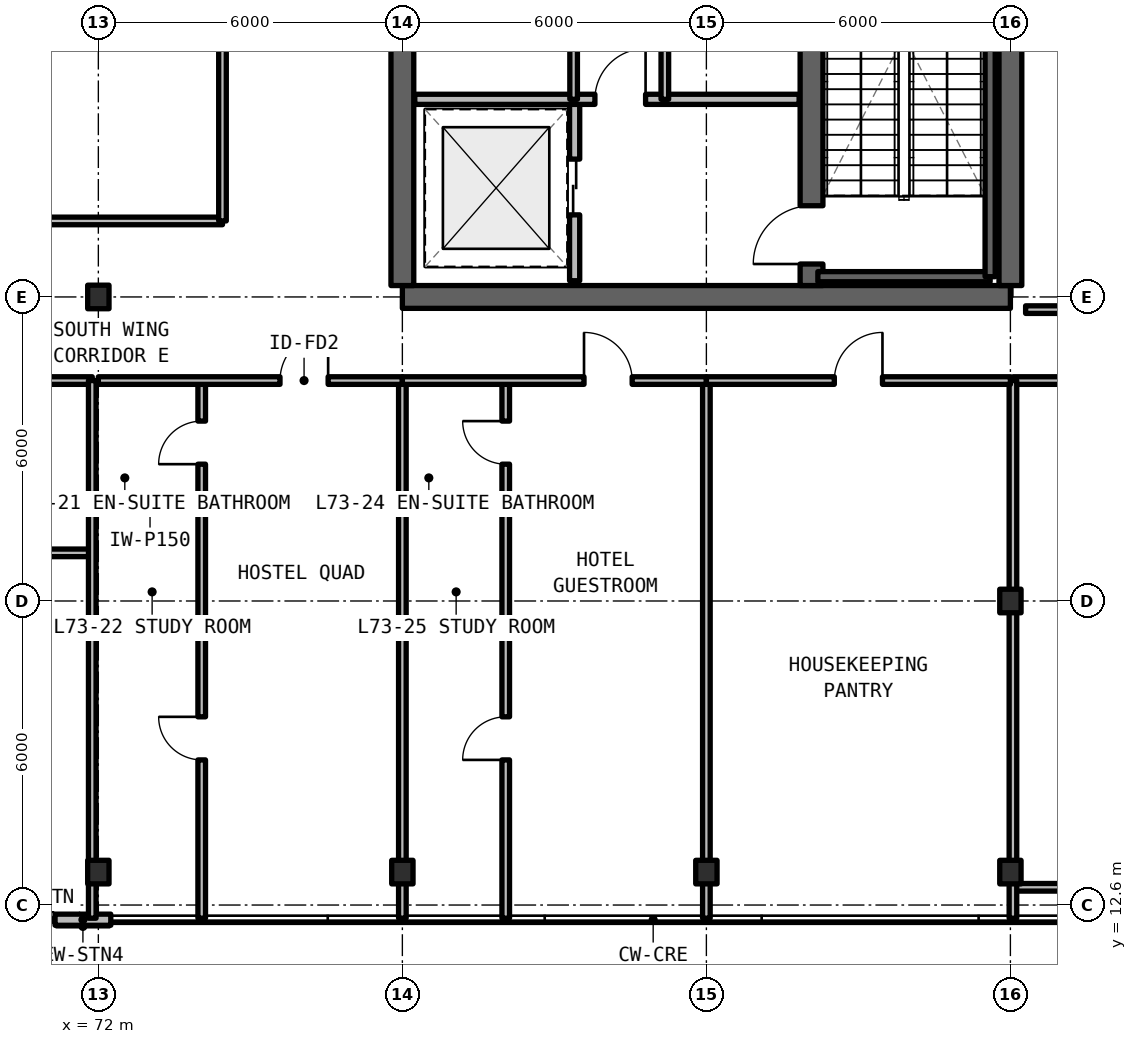
"""IFC4 building model, lengths in metres.
Left out: names, types, materials, properties, quantities, classifications, styles, units other than length and angle.
Written with IfcOpenShell. Run it as: python <this file> out.ifc"""

import sys

from ifc_helpers import new_model, si_unit, direction, frame, frame_2d, origin, origin_2d, place, context, subcontext, project, spatial, rectangle, i_section, extrude, element, fill, save


model = new_model("IFC4")
c1 = context("Model", 3, precision=1e-05, world=origin(), true_north=direction((0.0, 1.0)))
c2 = subcontext(c1, "Body", "Model", "MODEL_VIEW")
j1 = project(units=[si_unit("LENGTHUNIT", "METRE"), si_unit("PLANEANGLEUNIT", "RADIAN")], contexts=[c1])
p1 = place(None, origin())
s1 = spatial("IfcSite", under=j1, at=p1, CompositionType="ELEMENT")
p2 = place(p1, origin())
s2 = spatial("IfcBuilding", under=s1, at=p2, CompositionType="ELEMENT")
p3 = place(p2, frame((0.0, 0.0, 260.7)))
s3 = spatial("IfcBuildingStorey", under=s2, at=p3, CompositionType="ELEMENT", Elevation=260.7)
p4 = place(p3, frame((78.0, 24.6, 0.0), z_axis=(0.0, 0.0, 1.0), x_axis=(1.0, 0.0, 0.0)))
e1 = element("IfcWall", 1, at=p4, inside=s3, PredefinedType="SHEAR", context=c2, shape_type="SweptSolid", body=[
    extrude(rectangle(XDim=12.0, YDim=0.45, at=frame_2d((6.0, 0.0))), origin(), (0.0, 0.0, 1.0), 3.63),
])
p5 = place(p3, frame((90.0, 24.825, 0.0), z_axis=(0.0, 0.0, 1.0), x_axis=(0.0, 1.0, 0.0)))
e2 = element("IfcWall", 2, at=p5, inside=s3, PredefinedType="SHEAR", context=c2, shape_type="SweptSolid", body=[
    extrude(rectangle(XDim=17.55, YDim=0.45, at=frame_2d((8.775, 0.0))), origin(), (0.0, 0.0, 1.0), 3.63),
])
p6 = place(p3, frame((78.0, 24.825, 0.0), z_axis=(0.0, 0.0, 1.0), x_axis=(0.0, 1.0, 0.0)))
e3 = element("IfcWall", 3, at=p6, inside=s3, PredefinedType="SHEAR", context=c2, shape_type="SweptSolid", body=[
    extrude(rectangle(XDim=8.975, YDim=0.45, at=frame_2d((4.488, 0.0))), origin(), (0.0, 0.0, 1.0), 3.63),
])
p7 = place(p3, frame((86.075, 24.825, 0.0), z_axis=(0.0, 0.0, 1.0), x_axis=(0.0, 1.0, 0.0)))
e4 = element("IfcWall", 4, at=p7, inside=s3, PredefinedType="SHEAR", context=c2, shape_type="SweptSolid", body=[
    extrude(rectangle(XDim=17.55, YDim=0.45, at=frame_2d((8.775, 0.0))), origin(), (0.0, 0.0, 1.0), 3.63),
])
p8 = place(p7, frame((0.425, 0.0, 0.0)))
e5 = element("IfcOpeningElement", 5, at=p8, cuts=e4, PredefinedType="OPENING", context=c2, shape_type="SweptSolid", body=[
    extrude(rectangle(XDim=1.15, YDim=2.15, at=frame_2d((0.575, 1.075))), frame((0.0, 0.235, 0.0), z_axis=(0.0, -1.0, 0.0), x_axis=(1.0, 0.0, 0.0)), (0.0, 0.0, 1.0), 0.47),
])
p9 = place(p7, frame((9.625, 0.0, 0.0)))
e6 = element("IfcOpeningElement", 6, at=p9, cuts=e4, PredefinedType="OPENING", context=c2, shape_type="SweptSolid", body=[
    extrude(rectangle(XDim=1.15, YDim=2.15, at=frame_2d((0.575, 1.075))), frame((0.0, 0.235, 0.0), z_axis=(0.0, -1.0, 0.0), x_axis=(1.0, 0.0, 0.0)), (0.0, 0.0, 1.0), 0.47),
])
for number, where, z_axis, x_axis in (
    (7, (72.0, 24.6, 0.0), (0.0, 0.0, 1.0), (1.0, 0.0, 0.0)),
    (8, (90.0, 18.6, 0.0), (0.0, 0.0, 1.0), (1.0, 0.0, 0.0)),
    (9, (72.0, 13.25, 0.0), (0.0, 0.0, 1.0), (1.0, 0.0, 0.0)),
    (10, (78.0, 13.25, 0.0), (0.0, 0.0, 1.0), (1.0, 0.0, 0.0)),
    (11, (84.0, 13.25, 0.0), (0.0, 0.0, 1.0), (1.0, 0.0, 0.0)),
    (12, (90.0, 13.25, 0.0), (0.0, 0.0, 1.0), (1.0, 0.0, 0.0)),
):
    element("IfcColumn", number, at=place(p3, frame(where, z_axis=z_axis, x_axis=x_axis)), inside=s3, PredefinedType="COLUMN", context=c2, shape_type="SweptSolid", body=[
        extrude(i_section(OverallWidth=0.421, OverallDepth=0.465, WebThickness=0.045, FlangeThickness=0.07, FilletRadius=0.015, at=origin_2d()), origin(), (0.0, 0.0, 1.0), 3.63),
    ])
p10 = place(p3, frame((71.146, 12.31, 0.0), z_axis=(0.0, 0.0, 1.0), x_axis=(1.0, 0.0, 0.0)))
e13 = element("IfcWall", 13, at=p10, inside=s3, PredefinedType="SOLIDWALL", context=c2, shape_type="SweptSolid", body=[
    extrude(rectangle(XDim=1.1, YDim=0.22, at=frame_2d((0.55, 0.0))), origin(), (0.0, 0.0, 1.0), 3.41),
])
p11 = place(p3, frame((81.4, 24.92, 0.0), z_axis=(0.0, 0.0, 1.0), x_axis=(0.0, 1.0, 0.0)))
e14 = element("IfcWall", 14, at=p11, inside=s3, PredefinedType="SOLIDWALL", context=c2, shape_type="SweptSolid", body=[
    extrude(rectangle(XDim=3.58, YDim=0.2, at=frame_2d((1.79, 0.0))), origin(), (0.0, 0.0, 1.0), 2.63),
])
p12 = place(p11, frame((1.3, 0.0, 0.0)))
e15 = element("IfcOpeningElement", 15, at=p12, cuts=e14, PredefinedType="OPENING", context=c2, shape_type="SweptSolid", body=[
    extrude(rectangle(XDim=1.1, YDim=2.2, at=frame_2d((0.55, 1.1))), frame((0.0, 0.11, 0.0), z_axis=(0.0, -1.0, 0.0), x_axis=(1.0, 0.0, 0.0)), (0.0, 0.0, 1.0), 0.22),
])
p13 = place(p3, frame((78.245, 28.5, 0.0), z_axis=(0.0, 0.0, 1.0), x_axis=(1.0, 0.0, 0.0)))
e16 = element("IfcWall", 16, at=p13, inside=s3, PredefinedType="SOLIDWALL", context=c2, shape_type="SweptSolid", body=[
    extrude(rectangle(XDim=7.585, YDim=0.2, at=frame_2d((3.792, 0.0))), origin(), (0.0, 0.0, 1.0), 2.63),
])
p14 = place(p13, frame((3.555, 0.0, 0.0)))
e17 = element("IfcOpeningElement", 17, at=p14, cuts=e16, PredefinedType="OPENING", context=c2, shape_type="SweptSolid", body=[
    extrude(rectangle(XDim=1.0, YDim=2.15, at=frame_2d((0.5, 1.075))), frame((0.0, 0.11, 0.0), z_axis=(0.0, -1.0, 0.0), x_axis=(1.0, 0.0, 0.0)), (0.0, 0.0, 1.0), 0.22),
])
p15 = place(p3, frame((83.18, 28.5, 0.0), z_axis=(0.0, 0.0, 1.0), x_axis=(0.0, 1.0, 0.0)))
e18 = element("IfcWall", 18, at=p15, inside=s3, PredefinedType="SOLIDWALL", context=c2, shape_type="SweptSolid", body=[
    extrude(rectangle(XDim=5.22, YDim=0.15, at=frame_2d((2.61, 0.0))), origin(), (0.0, 0.0, 1.0), 2.63),
])
p16 = place(p15, frame((2.1, 0.0, 0.0)))
e19 = element("IfcOpeningElement", 19, at=p16, cuts=e18, PredefinedType="OPENING", context=c2, shape_type="SweptSolid", body=[
    extrude(rectangle(XDim=0.95, YDim=2.15, at=frame_2d((0.475, 1.075))), frame((0.0, 0.085, 0.0), z_axis=(0.0, -1.0, 0.0), x_axis=(1.0, 0.0, 0.0)), (0.0, 0.0, 1.0), 0.17),
])
p17 = place(p3, frame((81.38, 28.5, 0.0), z_axis=(0.0, 0.0, 1.0), x_axis=(0.0, 1.0, 0.0)))
e20 = element("IfcWall", 20, at=p17, inside=s3, PredefinedType="SOLIDWALL", context=c2, shape_type="SweptSolid", body=[
    extrude(rectangle(XDim=5.22, YDim=0.15, at=frame_2d((2.61, 0.0))), origin(), (0.0, 0.0, 1.0), 2.63),
])
p18 = place(p17, frame((2.0, 0.0, 0.0)))
e21 = element("IfcOpeningElement", 21, at=p18, cuts=e20, PredefinedType="OPENING", context=c2, shape_type="SweptSolid", body=[
    extrude(rectangle(XDim=0.95, YDim=2.15, at=frame_2d((0.475, 1.075))), frame((0.0, 0.085, 0.0), z_axis=(0.0, -1.0, 0.0), x_axis=(1.0, 0.0, 0.0)), (0.0, 0.0, 1.0), 0.17),
])
p19 = place(p3, frame((64.8, 19.55, 0.0), z_axis=(0.0, 0.0, 1.0), x_axis=(1.0, 0.0, 0.0)))
e22 = element("IfcWall", 22, at=p19, inside=s3, PredefinedType="SOLIDWALL", context=c2, shape_type="SweptSolid", body=[
    extrude(rectangle(XDim=7.08, YDim=0.15, at=frame_2d((3.54, 0.0))), origin(), (0.0, 0.0, 1.0), 2.63),
])
p20 = place(p3, frame((64.8, 22.95, 0.0), z_axis=(0.0, 0.0, 1.0), x_axis=(1.0, 0.0, 0.0)))
e23 = element("IfcWall", 23, at=p20, inside=s3, PredefinedType="SOLIDWALL", context=c2, shape_type="SweptSolid", body=[
    extrude(rectangle(XDim=7.08, YDim=0.15, at=frame_2d((3.54, 0.0))), origin(), (0.0, 0.0, 1.0), 2.63),
])
p21 = place(p20, frame((3.225, 0.0, 0.0)))
e24 = element("IfcOpeningElement", 24, at=p21, cuts=e23, PredefinedType="OPENING", context=c2, shape_type="SweptSolid", body=[
    extrude(rectangle(XDim=0.85, YDim=2.1, at=frame_2d((0.425, 1.05))), frame((0.0, 0.085, 0.0), z_axis=(0.0, -1.0, 0.0), x_axis=(1.0, 0.0, 0.0)), (0.0, 0.0, 1.0), 0.17),
])
p22 = place(p3, frame((71.88, 12.34, 0.0), z_axis=(0.0, 0.0, 1.0), x_axis=(0.0, 1.0, 0.0)))
e25 = element("IfcWall", 25, at=p22, inside=s3, PredefinedType="SOLIDWALL", context=c2, shape_type="SweptSolid", body=[
    extrude(rectangle(XDim=10.61, YDim=0.15, at=frame_2d((5.305, 0.0))), origin(), (0.0, 0.0, 1.0), 2.63),
])
p23 = place(p3, frame((90.3, 24.35, 0.0), z_axis=(0.0, 0.0, 1.0), x_axis=(1.0, 0.0, 0.0)))
e26 = element("IfcWall", 26, at=p23, inside=s3, PredefinedType="SOLIDWALL", context=c2, shape_type="SweptSolid", body=[
    extrude(rectangle(XDim=8.52, YDim=0.15, at=frame_2d((4.26, 0.0))), origin(), (0.0, 0.0, 1.0), 2.63),
])
p24 = place(p23, frame((0.975, 0.0, 0.0)))
e27 = element("IfcOpeningElement", 27, at=p24, cuts=e26, PredefinedType="OPENING", context=c2, shape_type="SweptSolid", body=[
    extrude(rectangle(XDim=0.95, YDim=2.15, at=frame_2d((0.475, 1.075))), frame((0.0, 0.085, 0.0), z_axis=(0.0, -1.0, 0.0), x_axis=(1.0, 0.0, 0.0)), (0.0, 0.0, 1.0), 0.17),
])
p25 = place(p3, frame((90.05, 12.95, 0.0), z_axis=(0.0, 0.0, 1.0), x_axis=(1.0, 0.0, 0.0)))
e28 = element("IfcWall", 28, at=p25, inside=s3, PredefinedType="SOLIDWALL", context=c2, shape_type="SweptSolid", body=[
    extrude(rectangle(XDim=5.37, YDim=0.15, at=frame_2d((2.685, 0.0))), origin(), (0.0, 0.0, 1.0), 2.63),
])
p26 = place(p3, frame((90.05, 22.95, 0.0), z_axis=(0.0, 0.0, 1.0), x_axis=(1.0, 0.0, 0.0)))
e29 = element("IfcWall", 29, at=p26, inside=s3, PredefinedType="SOLIDWALL", context=c2, shape_type="SweptSolid", body=[
    extrude(rectangle(XDim=5.37, YDim=0.15, at=frame_2d((2.685, 0.0))), origin(), (0.0, 0.0, 1.0), 2.63),
])
p27 = place(p26, frame((1.125, 0.0, 0.0)))
e30 = element("IfcOpeningElement", 30, at=p27, cuts=e29, PredefinedType="OPENING", context=c2, shape_type="SweptSolid", body=[
    extrude(rectangle(XDim=0.85, YDim=2.1, at=frame_2d((0.425, 1.05))), frame((0.0, 0.085, 0.0), z_axis=(0.0, -1.0, 0.0), x_axis=(1.0, 0.0, 0.0)), (0.0, 0.0, 1.0), 0.17),
])
for number, where, z_axis, x_axis in (
    (31, (90.05, 12.34, 0.0), (0.0, 0.0, 1.0), (0.0, 1.0, 0.0)),
    (32, (78.0, 12.34, 0.0), (0.0, 0.0, 1.0), (0.0, 1.0, 0.0)),
):
    element("IfcWall", number, at=place(p3, frame(where, z_axis=z_axis, x_axis=x_axis)), inside=s3, PredefinedType="SOLIDWALL", context=c2, shape_type="SweptSolid", body=[
        extrude(rectangle(XDim=10.61, YDim=0.15, at=frame_2d((5.305, 0.0))), origin(), (0.0, 0.0, 1.0), 2.63),
    ])
p28 = place(p3, frame((72.0, 20.5, 0.0), z_axis=(0.0, 0.0, 1.0), x_axis=(1.0, 0.0, 0.0)))
e33 = element("IfcWall", 33, at=p28, inside=s3, PredefinedType="PARTITIONING", context=c2, shape_type="SweptSolid", body=[
    extrude(rectangle(XDim=2.04, YDim=0.15, at=frame_2d((1.02, 0.0))), origin(), (0.0, 0.0, 1.0), 2.63),
])
p29 = place(p3, frame((74.04, 12.34, 0.0), z_axis=(0.0, 0.0, 1.0), x_axis=(0.0, 1.0, 0.0)))
e34 = element("IfcWall", 34, at=p29, inside=s3, PredefinedType="PARTITIONING", context=c2, shape_type="SweptSolid", body=[
    extrude(rectangle(XDim=10.61, YDim=0.15, at=frame_2d((5.305, 0.0))), origin(), (0.0, 0.0, 1.0), 2.63),
])
p30 = place(p29, frame((3.124, 0.0, 0.0)))
e35 = element("IfcOpeningElement", 35, at=p30, cuts=e34, PredefinedType="OPENING", context=c2, shape_type="SweptSolid", body=[
    extrude(rectangle(XDim=0.85, YDim=2.1, at=frame_2d((0.425, 1.05))), frame((0.0, 0.085, 0.0), z_axis=(0.0, -1.0, 0.0), x_axis=(1.0, 0.0, 0.0)), (0.0, 0.0, 1.0), 0.17),
])
p31 = place(p29, frame((8.96, 0.0, 0.0)))
e36 = element("IfcOpeningElement", 36, at=p31, cuts=e34, PredefinedType="OPENING", context=c2, shape_type="SweptSolid", body=[
    extrude(rectangle(XDim=0.85, YDim=2.1, at=frame_2d((0.425, 1.05))), frame((0.0, 0.085, 0.0), z_axis=(0.0, -1.0, 0.0), x_axis=(1.0, 0.0, 0.0)), (0.0, 0.0, 1.0), 0.17),
])
p32 = place(p3, frame((72.0, 22.95, 0.0), z_axis=(0.0, 0.0, 1.0), x_axis=(1.0, 0.0, 0.0)))
e37 = element("IfcWall", 37, at=p32, inside=s3, PredefinedType="SOLIDWALL", context=c2, shape_type="SweptSolid", body=[
    extrude(rectangle(XDim=6.0, YDim=0.15, at=frame_2d((3.0, 0.0))), origin(), (0.0, 0.0, 1.0), 2.63),
])
p33 = place(p32, frame((3.585, 0.0, 0.0)))
e38 = element("IfcOpeningElement", 38, at=p33, cuts=e37, PredefinedType="OPENING", context=c2, shape_type="SweptSolid", body=[
    extrude(rectangle(XDim=0.95, YDim=2.15, at=frame_2d((0.475, 1.075))), frame((0.0, 0.085, 0.0), z_axis=(0.0, -1.0, 0.0), x_axis=(1.0, 0.0, 0.0)), (0.0, 0.0, 1.0), 0.17),
])
p34 = place(p3, frame((84.0, 12.34, 0.0), z_axis=(0.0, 0.0, 1.0), x_axis=(0.0, 1.0, 0.0)))
e39 = element("IfcWall", 39, at=p34, inside=s3, PredefinedType="SOLIDWALL", context=c2, shape_type="SweptSolid", body=[
    extrude(rectangle(XDim=10.61, YDim=0.15, at=frame_2d((5.305, 0.0))), origin(), (0.0, 0.0, 1.0), 2.63),
])
p35 = place(p3, frame((78.0, 20.5, 0.0), z_axis=(0.0, 0.0, 1.0), x_axis=(1.0, 0.0, 0.0)))
e40 = element("IfcWall", 40, at=p35, inside=s3, PredefinedType="PARTITIONING", context=c2, shape_type="SweptSolid", body=[
    extrude(rectangle(XDim=2.04, YDim=0.15, at=frame_2d((1.02, 0.0))), origin(), (0.0, 0.0, 1.0), 2.63),
])
p36 = place(p3, frame((80.04, 12.34, 0.0), z_axis=(0.0, 0.0, 1.0), x_axis=(0.0, 1.0, 0.0)))
e41 = element("IfcWall", 41, at=p36, inside=s3, PredefinedType="PARTITIONING", context=c2, shape_type="SweptSolid", body=[
    extrude(rectangle(XDim=10.61, YDim=0.15, at=frame_2d((5.305, 0.0))), origin(), (0.0, 0.0, 1.0), 2.63),
])
p37 = place(p36, frame((3.124, 0.0, 0.0)))
e42 = element("IfcOpeningElement", 42, at=p37, cuts=e41, PredefinedType="OPENING", context=c2, shape_type="SweptSolid", body=[
    extrude(rectangle(XDim=0.85, YDim=2.1, at=frame_2d((0.425, 1.05))), frame((0.0, 0.085, 0.0), z_axis=(0.0, -1.0, 0.0), x_axis=(1.0, 0.0, 0.0)), (0.0, 0.0, 1.0), 0.17),
])
p38 = place(p36, frame((8.96, 0.0, 0.0)))
e43 = element("IfcOpeningElement", 43, at=p38, cuts=e41, PredefinedType="OPENING", context=c2, shape_type="SweptSolid", body=[
    extrude(rectangle(XDim=0.85, YDim=2.1, at=frame_2d((0.425, 1.05))), frame((0.0, 0.085, 0.0), z_axis=(0.0, -1.0, 0.0), x_axis=(1.0, 0.0, 0.0)), (0.0, 0.0, 1.0), 0.17),
])
p39 = place(p3, frame((78.0, 22.95, 0.0), z_axis=(0.0, 0.0, 1.0), x_axis=(1.0, 0.0, 0.0)))
e44 = element("IfcWall", 44, at=p39, inside=s3, PredefinedType="SOLIDWALL", context=c2, shape_type="SweptSolid", body=[
    extrude(rectangle(XDim=6.0, YDim=0.15, at=frame_2d((3.0, 0.0))), origin(), (0.0, 0.0, 1.0), 2.63),
])
p40 = place(p39, frame((3.585, 0.0, 0.0)))
e45 = element("IfcOpeningElement", 45, at=p40, cuts=e44, PredefinedType="OPENING", context=c2, shape_type="SweptSolid", body=[
    extrude(rectangle(XDim=0.95, YDim=2.15, at=frame_2d((0.475, 1.075))), frame((0.0, 0.085, 0.0), z_axis=(0.0, -1.0, 0.0), x_axis=(1.0, 0.0, 0.0)), (0.0, 0.0, 1.0), 0.17),
])
p41 = place(p3, frame((84.0, 22.95, 0.0), z_axis=(0.0, 0.0, 1.0), x_axis=(1.0, 0.0, 0.0)))
e46 = element("IfcWall", 46, at=p41, inside=s3, PredefinedType="SOLIDWALL", context=c2, shape_type="SweptSolid", body=[
    extrude(rectangle(XDim=6.0, YDim=0.15, at=frame_2d((3.0, 0.0))), origin(), (0.0, 0.0, 1.0), 2.63),
])
p42 = place(p41, frame((2.525, 0.0, 0.0)))
e47 = element("IfcOpeningElement", 47, at=p42, cuts=e46, PredefinedType="OPENING", context=c2, shape_type="SweptSolid", body=[
    extrude(rectangle(XDim=0.95, YDim=2.15, at=frame_2d((0.475, 1.075))), frame((0.0, 0.085, 0.0), z_axis=(0.0, -1.0, 0.0), x_axis=(1.0, 0.0, 0.0)), (0.0, 0.0, 1.0), 0.17),
])
p43 = place(p3, frame((60.2, 26.1, 0.0), z_axis=(0.0, 0.0, 1.0), x_axis=(1.0, 0.0, 0.0)))
e48 = element("IfcWall", 48, at=p43, inside=s3, PredefinedType="SOLIDWALL", context=c2, shape_type="SweptSolid", body=[
    extrude(rectangle(XDim=14.25, YDim=0.15, at=frame_2d((7.125, 0.0))), origin(), (0.0, 0.0, 1.0), 2.63),
])
p44 = place(p3, frame((74.45, 26.1, 0.0), z_axis=(0.0, 0.0, 1.0), x_axis=(0.0, 1.0, 0.0)))
e49 = element("IfcWall", 49, at=p44, inside=s3, PredefinedType="SOLIDWALL", context=c2, shape_type="SweptSolid", body=[
    extrude(rectangle(XDim=7.4, YDim=0.15, at=frame_2d((3.7, 0.0))), origin(), (0.0, 0.0, 1.0), 2.63),
])
p45 = place(p44, frame((4.05, 0.0, 0.0)))
e50 = element("IfcOpeningElement", 50, at=p45, cuts=e49, PredefinedType="OPENING", context=c2, shape_type="SweptSolid", body=[
    extrude(rectangle(XDim=1.1, YDim=2.15, at=frame_2d((0.55, 1.075))), frame((0.0, 0.085, 0.0), z_axis=(0.0, -1.0, 0.0), x_axis=(1.0, 0.0, 0.0)), (0.0, 0.0, 1.0), 0.17),
])
p46 = place(p3, frame((86.2, 25.0, 0.0), z_axis=(0.0, 0.0, 1.0), x_axis=(1.0, 0.0, 0.0)))
e51 = element("IfcWall", 51, at=p46, inside=s3, PredefinedType="SOLIDWALL", context=c2, shape_type="SweptSolid", body=[
    extrude(rectangle(XDim=3.4, YDim=0.2, at=frame_2d((1.7, 0.0))), origin(), (0.0, 0.0, 1.0), 3.63),
])
p47 = place(p3, frame((89.6, 25.0, 0.0), z_axis=(0.0, 0.0, 1.0), x_axis=(0.0, 1.0, 0.0)))
e52 = element("IfcWall", 52, at=p47, inside=s3, PredefinedType="SOLIDWALL", context=c2, shape_type="SweptSolid", body=[
    extrude(rectangle(XDim=8.0, YDim=0.2, at=frame_2d((4.0, 0.0))), origin(), (0.0, 0.0, 1.0), 3.63),
])
p48 = place(p12, origin())
e53 = element("IfcDoor", 53, at=p48, inside=s3, OperationType="SLIDING_TO_LEFT", PredefinedType="DOOR", context=c2, shape_type="SweptSolid", body=[
    extrude(rectangle(XDim=1.1, YDim=2.2, at=frame_2d((0.55, 1.1))), frame((0.0, 0.025, 0.0), z_axis=(0.0, -1.0, 0.0), x_axis=(1.0, 0.0, 0.0)), (0.0, 0.0, 1.0), 0.05),
])
fill(e15, e53)
p49 = place(p14, origin())
e54 = element("IfcDoor", 54, at=p49, inside=s3, OperationType="SINGLE_SWING_RIGHT", PredefinedType="DOOR", context=c2, shape_type="SweptSolid", body=[
    extrude(rectangle(XDim=1.0, YDim=2.15, at=frame_2d((0.5, 1.075))), frame((0.0, 0.025, 0.0), z_axis=(0.0, -1.0, 0.0), x_axis=(1.0, 0.0, 0.0)), (0.0, 0.0, 1.0), 0.05),
])
fill(e17, e54)
p50 = place(p30, origin())
e55 = element("IfcDoor", 55, at=p50, inside=s3, OperationType="SINGLE_SWING_RIGHT", PredefinedType="DOOR", context=c2, shape_type="SweptSolid", body=[
    extrude(rectangle(XDim=0.85, YDim=2.1, at=frame_2d((0.425, 1.05))), frame((0.0, 0.025, 0.0), z_axis=(0.0, -1.0, 0.0), x_axis=(1.0, 0.0, 0.0)), (0.0, 0.0, 1.0), 0.05),
])
fill(e35, e55)
p51 = place(p31, origin())
e56 = element("IfcDoor", 56, at=p51, inside=s3, OperationType="SINGLE_SWING_LEFT", PredefinedType="DOOR", context=c2, shape_type="SweptSolid", body=[
    extrude(rectangle(XDim=0.85, YDim=2.1, at=frame_2d((0.425, 1.05))), frame((0.0, 0.025, 0.0), z_axis=(0.0, -1.0, 0.0), x_axis=(1.0, 0.0, 0.0)), (0.0, 0.0, 1.0), 0.05),
])
fill(e36, e56)
p52 = place(p33, origin())
e57 = element("IfcDoor", 57, at=p52, inside=s3, OperationType="SINGLE_SWING_RIGHT", PredefinedType="DOOR", context=c2, shape_type="SweptSolid", body=[
    extrude(rectangle(XDim=0.95, YDim=2.15, at=frame_2d((0.475, 1.075))), frame((0.0, 0.025, 0.0), z_axis=(0.0, -1.0, 0.0), x_axis=(1.0, 0.0, 0.0)), (0.0, 0.0, 1.0), 0.05),
])
fill(e38, e57)
p53 = place(p37, origin())
e58 = element("IfcDoor", 58, at=p53, inside=s3, OperationType="SINGLE_SWING_LEFT", PredefinedType="DOOR", context=c2, shape_type="SweptSolid", body=[
    extrude(rectangle(XDim=0.85, YDim=2.1, at=frame_2d((0.425, 1.05))), frame((0.0, 0.025, 0.0), z_axis=(0.0, -1.0, 0.0), x_axis=(1.0, 0.0, 0.0)), (0.0, 0.0, 1.0), 0.05),
])
fill(e42, e58)
p54 = place(p38, origin())
e59 = element("IfcDoor", 59, at=p54, inside=s3, OperationType="SINGLE_SWING_RIGHT", PredefinedType="DOOR", context=c2, shape_type="SweptSolid", body=[
    extrude(rectangle(XDim=0.85, YDim=2.1, at=frame_2d((0.425, 1.05))), frame((0.0, 0.025, 0.0), z_axis=(0.0, -1.0, 0.0), x_axis=(1.0, 0.0, 0.0)), (0.0, 0.0, 1.0), 0.05),
])
fill(e43, e59)
p55 = place(p40, origin())
e60 = element("IfcDoor", 60, at=p55, inside=s3, OperationType="SINGLE_SWING_LEFT", PredefinedType="DOOR", context=c2, shape_type="SweptSolid", body=[
    extrude(rectangle(XDim=0.95, YDim=2.15, at=frame_2d((0.475, 1.075))), frame((0.0, 0.025, 0.0), z_axis=(0.0, -1.0, 0.0), x_axis=(1.0, 0.0, 0.0)), (0.0, 0.0, 1.0), 0.05),
])
fill(e45, e60)
p56 = place(p42, origin())
e61 = element("IfcDoor", 61, at=p56, inside=s3, OperationType="SINGLE_SWING_RIGHT", PredefinedType="DOOR", context=c2, shape_type="SweptSolid", body=[
    extrude(rectangle(XDim=0.95, YDim=2.15, at=frame_2d((0.475, 1.075))), frame((0.0, 0.025, 0.0), z_axis=(0.0, -1.0, 0.0), x_axis=(1.0, 0.0, 0.0)), (0.0, 0.0, 1.0), 0.05),
])
fill(e47, e61)
p57 = place(p8, origin())
e62 = element("IfcDoor", 62, at=p57, inside=s3, OperationType="SINGLE_SWING_LEFT", PredefinedType="DOOR", context=c2, shape_type="SweptSolid", body=[
    extrude(rectangle(XDim=1.15, YDim=2.15, at=frame_2d((0.575, 1.075))), frame((0.0, 0.025, 0.0), z_axis=(0.0, -1.0, 0.0), x_axis=(1.0, 0.0, 0.0)), (0.0, 0.0, 1.0), 0.05),
])
fill(e5, e62)
save(model, sys.argv[1])
